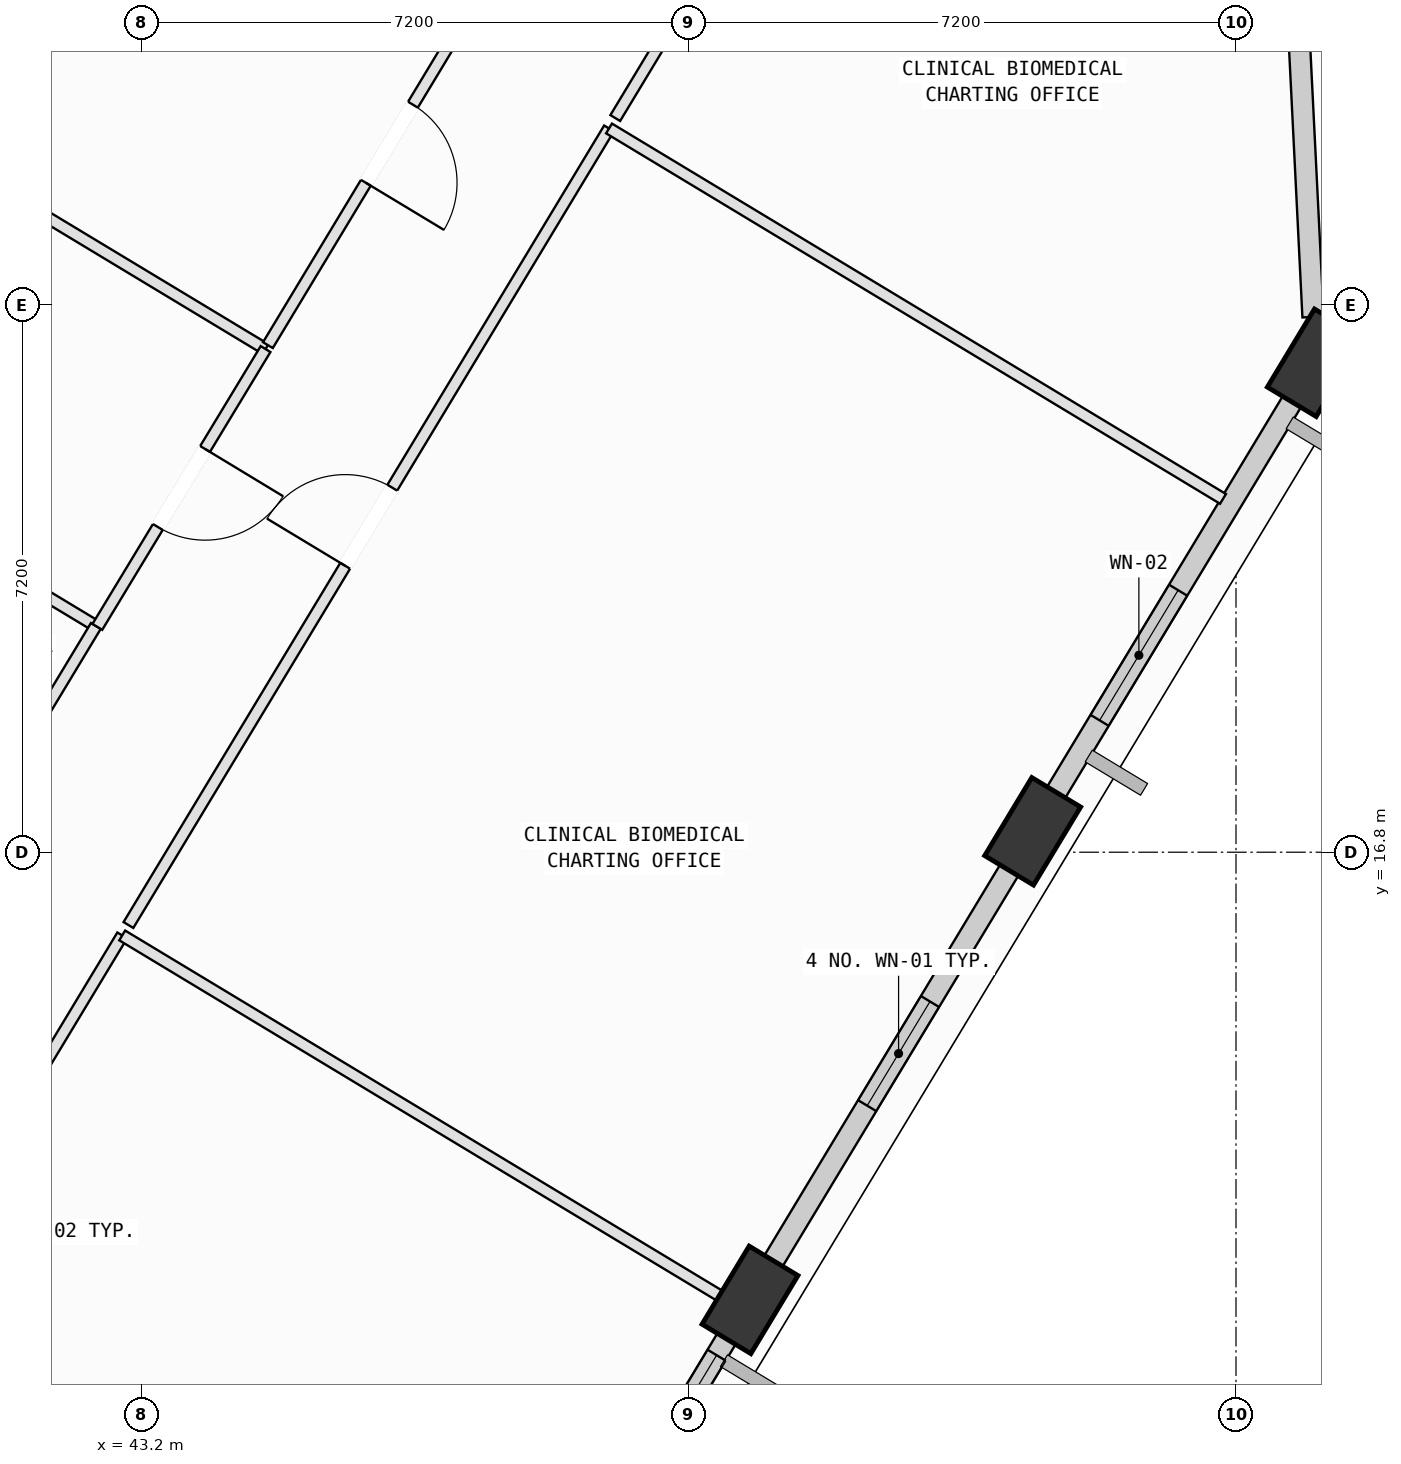
"""IFC4 building model, lengths in metres.
Left out: names, types, materials, properties, quantities, classifications, styles, units other than length and angle.
Written with IfcOpenShell. Run it as: python <this file> out.ifc"""

import sys

from ifc_helpers import new_model, si_unit, direction, frame, frame_2d, origin, origin_2d, place, context, subcontext, project, spatial, rectangle, extrude, element, fill, save


model = new_model("IFC4")
c1 = context("Model", 3, precision=1e-05, world=origin(), true_north=direction((0.0, 1.0)))
c2 = subcontext(c1, "Body", "Model", "MODEL_VIEW")
j1 = project(units=[si_unit("LENGTHUNIT", "METRE"), si_unit("PLANEANGLEUNIT", "RADIAN")], contexts=[c1])
p1 = place(None, origin())
s1 = spatial("IfcSite", under=j1, at=p1, CompositionType="ELEMENT")
p2 = place(p1, origin())
s2 = spatial("IfcBuilding", under=s1, at=p2, CompositionType="ELEMENT")
p3 = place(p2, frame((0.0, 0.0, 276.6)))
s3 = spatial("IfcBuildingStorey", under=s2, at=p3, CompositionType="ELEMENT", Elevation=276.6)
p4 = place(p3, frame((51.206, 10.91, 0.002), z_axis=(0.056692424578, 0.073177024428, 0.995706328237), x_axis=(-0.930488175419, -0.357643802358, 0.079263270434)))
e1 = element("IfcColumn", 1, at=p4, inside=s3, PredefinedType="COLUMN", context=c2, shape_type="SweptSolid", body=[
    extrude(rectangle(XDim=1.2, YDim=0.75, at=origin_2d()), origin(), (0.0, 0.0, 1.0), 4.014),
])
p5 = place(p3, frame((54.925, 17.075, 0.002), z_axis=(0.031141357072, 0.088254119357, 0.995611081847), x_axis=(-0.770772512069, -0.632050636346, 0.080135683274)))
e2 = element("IfcColumn", 2, at=p5, inside=s3, PredefinedType="COLUMN", context=c2, shape_type="SweptSolid", body=[
    extrude(rectangle(XDim=1.2, YDim=0.75, at=origin_2d()), origin(), (0.0, 0.0, 1.0), 4.014),
])
p6 = place(p3, frame((58.644, 23.24, 0.002), z_axis=(0.005590225413, 0.103297643506, 0.994634780322), x_axis=(-0.561801790444, -0.822515876559, 0.08857980053)))
e3 = element("IfcColumn", 3, at=p6, inside=s3, PredefinedType="COLUMN", context=c2, shape_type="SweptSolid", body=[
    extrude(rectangle(XDim=1.2, YDim=0.75, at=origin_2d()), origin(), (0.0, 0.0, 1.0), 4.018),
])
p7 = place(p3, frame((51.096, 10.728, 0.0), z_axis=(0.0, 0.0, 1.0), x_axis=(-0.516526398174, -0.856271265423, 0.0)))
e4 = element("IfcWall", 4, at=p7, inside=s3, PredefinedType="SOLIDWALL", context=c2, shape_type="SweptSolid", body=[
    extrude(rectangle(XDim=6.414, YDim=0.28, at=frame_2d((3.207, 0.0))), origin(), (0.0, 0.0, 1.0), 3.265),
])
p8 = place(p7, frame((2.604, 0.0, 0.75)))
e5 = element("IfcOpeningElement", 5, at=p8, cuts=e4, PredefinedType="OPENING", context=c2, shape_type="SweptSolid", body=[
    extrude(rectangle(XDim=1.2, YDim=1.75, at=frame_2d((0.6, 0.875))), frame((0.0, 0.15, 0.0), z_axis=(0.0, -1.0, 0.0), x_axis=(1.0, 0.0, 0.0)), (0.0, 0.0, 1.0), 0.3),
])
p9 = place(p7, frame((0.637, 0.0, 0.75)))
e6 = element("IfcOpeningElement", 6, at=p9, cuts=e4, PredefinedType="OPENING", context=c2, shape_type="SweptSolid", body=[
    extrude(rectangle(XDim=1.2, YDim=1.75, at=frame_2d((0.6, 0.875))), frame((0.0, 0.15, 0.0), z_axis=(0.0, -1.0, 0.0), x_axis=(1.0, 0.0, 0.0)), (0.0, 0.0, 1.0), 0.3),
])
p10 = place(p3, frame((54.815, 16.894, 0.0), z_axis=(0.0, 0.0, 1.0), x_axis=(-0.516539738379, -0.856263218102, 0.0)))
e7 = element("IfcWall", 7, at=p10, inside=s3, PredefinedType="SOLIDWALL", context=c2, shape_type="SweptSolid", body=[
    extrude(rectangle(XDim=6.407, YDim=0.28, at=frame_2d((3.203, 0.0))), origin(), (0.0, 0.0, 1.0), 3.265),
])
p11 = place(p10, frame((2.404, 0.0, 0.75)))
e8 = element("IfcOpeningElement", 8, at=p11, cuts=e7, PredefinedType="OPENING", context=c2, shape_type="SweptSolid", body=[
    extrude(rectangle(XDim=1.6, YDim=1.95, at=frame_2d((0.8, 0.975))), frame((0.0, 0.15, 0.0), z_axis=(0.0, -1.0, 0.0), x_axis=(1.0, 0.0, 0.0)), (0.0, 0.0, 1.0), 0.3),
])
p12 = place(p3, frame((58.54, 23.067, 0.0), z_axis=(0.0, 0.0, 1.0), x_axis=(-0.51654717901, -0.856258729507, 0.0)))
e9 = element("IfcWall", 9, at=p12, inside=s3, PredefinedType="SOLIDWALL", context=c2, shape_type="SweptSolid", body=[
    extrude(rectangle(XDim=6.418, YDim=0.28, at=frame_2d((3.209, 0.0))), origin(), (0.0, 0.0, 1.0), 3.265),
])
p13 = place(p12, frame((3.293, 0.0, 0.75)))
e10 = element("IfcOpeningElement", 10, at=p13, cuts=e9, PredefinedType="OPENING", context=c2, shape_type="SweptSolid", body=[
    extrude(rectangle(XDim=2.0, YDim=1.95, at=frame_2d((1.0, 0.975))), frame((0.0, 0.15, 0.0), z_axis=(0.0, -1.0, 0.0), x_axis=(1.0, 0.0, 0.0)), (0.0, 0.0, 1.0), 0.3),
])
p14 = place(p3, frame((58.35, 29.13, 0.0), z_axis=(0.0, 0.0, 1.0), x_axis=(0.049760507536, -0.998761178606, 0.0)))
e11 = element("IfcWall", 11, at=p14, inside=s3, PredefinedType="SOLIDWALL", context=c2, shape_type="SweptSolid", body=[
    extrude(rectangle(XDim=5.294, YDim=0.28, at=frame_2d((2.647, 0.0))), origin(), (0.0, 0.0, 1.0), 3.265),
])
p15 = place(p3, frame((39.48, 9.96, 0.0), z_axis=(0.0, 0.0, 1.0), x_axis=(0.516575747775, 0.856241494446, 0.0)))
e12 = element("IfcWall", 12, at=p15, inside=s3, PredefinedType="PARTITIONING", context=c2, shape_type="SweptSolid", body=[
    extrude(rectangle(XDim=6.71, YDim=0.15, at=frame_2d((3.355, 0.0))), origin(), (0.0, 0.0, 1.0), 3.78),
])
p16 = place(p15, frame((2.755, 0.0, 0.0)))
e13 = element("IfcOpeningElement", 13, at=p16, cuts=e12, PredefinedType="OPENING", context=c2, shape_type="SweptSolid", body=[
    extrude(rectangle(XDim=1.2, YDim=2.15, at=frame_2d((0.6, 1.075))), frame((0.0, 0.085, 0.0), z_axis=(0.0, -1.0, 0.0), x_axis=(1.0, 0.0, 0.0)), (0.0, 0.0, 1.0), 0.17),
])
p17 = place(p3, frame((42.946, 15.705, 0.0), z_axis=(0.0, 0.0, 1.0), x_axis=(0.85631180797, -0.516459182831, 0.0)))
e14 = element("IfcWall", 14, at=p17, inside=s3, PredefinedType="PARTITIONING", context=c2, shape_type="SweptSolid", body=[
    extrude(rectangle(XDim=9.447, YDim=0.15, at=frame_2d((4.724, 0.0))), origin(), (0.0, 0.0, 1.0), 3.78),
])
p18 = place(p3, frame((43.028, 15.842, 0.0), z_axis=(0.0, 0.0, 1.0), x_axis=(0.516562112888, 0.856249720309, 0.0)))
e15 = element("IfcWall", 15, at=p18, inside=s3, PredefinedType="PARTITIONING", context=c2, shape_type="SweptSolid", body=[
    extrude(rectangle(XDim=12.24, YDim=0.15, at=frame_2d((6.12, 0.0))), origin(), (0.0, 0.0, 1.0), 3.415),
])
p19 = place(p18, frame((5.52, 0.0, 0.0)))
e16 = element("IfcOpeningElement", 16, at=p19, cuts=e15, PredefinedType="OPENING", context=c2, shape_type="SweptSolid", body=[
    extrude(rectangle(XDim=1.2, YDim=2.15, at=frame_2d((0.6, 1.075))), frame((0.0, 0.085, 0.0), z_axis=(0.0, -1.0, 0.0), x_axis=(1.0, 0.0, 0.0)), (0.0, 0.0, 1.0), 0.17),
])
p20 = place(p3, frame((49.351, 26.323, 0.0), z_axis=(0.0, 0.0, 1.0), x_axis=(0.856213909792, -0.516621467497, 0.0)))
e17 = element("IfcWall", 17, at=p20, inside=s3, PredefinedType="PARTITIONING", context=c2, shape_type="SweptSolid", body=[
    extrude(rectangle(XDim=9.434, YDim=0.15, at=frame_2d((4.717, 0.0))), origin(), (0.0, 0.0, 1.0), 3.78),
])
p21 = place(p3, frame((55.421, 17.452, 0.0), z_axis=(0.0, 0.0, 1.0), x_axis=(-0.516130040248, -0.856510234355, 0.0)))
e18 = element("IfcWall", 18, at=p21, inside=s3, PredefinedType="PARTITIONING", context=c2, shape_type="SweptSolid", body=[
    extrude(rectangle(XDim=0.791, YDim=0.15, at=frame_2d((0.395, 0.0))), origin(), (0.0, 0.0, 1.0), 3.265),
])
p22 = place(p3, frame((51.703, 11.289, 0.0), z_axis=(0.0, 0.0, 1.0), x_axis=(-0.515730444954, -0.856750902041, 0.0)))
e19 = element("IfcWall", 19, at=p22, inside=s3, PredefinedType="PARTITIONING", context=c2, shape_type="SweptSolid", body=[
    extrude(rectangle(XDim=0.581, YDim=0.15, at=frame_2d((0.291, 0.0))), origin(), (0.0, 0.0, 1.0), 3.265),
])
p23 = place(p3, frame((60.158, 25.304, 0.0), z_axis=(0.0, 0.0, 1.0), x_axis=(-0.516451858287, -0.85631622551, 0.0)))
e20 = element("IfcWall", 20, at=p23, inside=s3, PredefinedType="PARTITIONING", context=c2, shape_type="SweptSolid", body=[
    extrude(rectangle(XDim=2.751, YDim=0.15, at=frame_2d((1.375, 0.0))), origin(), (0.0, 0.0, 1.0), 3.265),
])
p24 = place(p3, frame((49.433, 26.46, 0.0), z_axis=(0.0, 0.0, 1.0), x_axis=(0.516637382187, 0.856204307001, 0.0)))
e21 = element("IfcWall", 21, at=p24, inside=s3, PredefinedType="PARTITIONING", context=c2, shape_type="SweptSolid", body=[
    extrude(rectangle(XDim=6.935, YDim=0.15, at=frame_2d((3.468, 0.0))), origin(), (0.0, 0.0, 1.0), 3.78),
])
p25 = place(p24, frame((2.868, 0.0, 0.0)))
e22 = element("IfcOpeningElement", 22, at=p25, cuts=e21, PredefinedType="OPENING", context=c2, shape_type="SweptSolid", body=[
    extrude(rectangle(XDim=1.2, YDim=2.15, at=frame_2d((0.6, 1.075))), frame((0.0, 0.085, 0.0), z_axis=(0.0, -1.0, 0.0), x_axis=(1.0, 0.0, 0.0)), (0.0, 0.0, 1.0), 0.17),
])
p26 = place(p3, frame((58.707, 27.99, 0.0), z_axis=(0.0, 0.0, 1.0), x_axis=(0.856196976415, -0.516649530704, 0.0)))
e23 = element("IfcWall", 23, at=p26, inside=s3, PredefinedType="PARTITIONING", context=c2, shape_type="SweptSolid", body=[
    extrude(rectangle(XDim=1.399, YDim=0.15, at=frame_2d((0.7, 0.0))), origin(), (0.0, 0.0, 1.0), 3.78),
])
p27 = place(p3, frame((34.464, 24.684, 0.0), z_axis=(0.0, 0.0, 1.0), x_axis=(0.856284272725, -0.516504834714, 0.0)))
e24 = element("IfcWall", 24, at=p27, inside=s3, PredefinedType="PARTITIONING", context=c2, shape_type="SweptSolid", body=[
    extrude(rectangle(XDim=9.5, YDim=0.15, at=frame_2d((4.75, 0.0))), origin(), (0.0, 0.0, 1.0), 3.78),
])
p28 = place(p3, frame((42.599, 19.777, 0.0), z_axis=(0.0, 0.0, 1.0), x_axis=(-0.516569402647, -0.856245322468, 0.0)))
e25 = element("IfcWall", 25, at=p28, inside=s3, PredefinedType="PARTITIONING", context=c2, shape_type="SweptSolid", body=[
    extrude(rectangle(XDim=6.038, YDim=0.15, at=frame_2d((3.019, 0.0))), origin(), (0.0, 0.0, 1.0), 3.78),
])
p29 = place(p3, frame((37.241, 27.999, 0.0), z_axis=(0.0, 0.0, 1.0), x_axis=(0.856273135167, -0.516523298594, 0.0)))
e26 = element("IfcWall", 26, at=p29, inside=s3, PredefinedType="PARTITIONING", context=c2, shape_type="SweptSolid", body=[
    extrude(rectangle(XDim=8.865, YDim=0.15, at=frame_2d((4.433, 0.0))), origin(), (0.0, 0.0, 1.0), 3.78),
])
p30 = place(p3, frame((44.832, 23.42, 0.0), z_axis=(0.0, 0.0, 1.0), x_axis=(-0.517953436176, -0.855408813348, 0.0)))
e27 = element("IfcWall", 27, at=p30, inside=s3, PredefinedType="PARTITIONING", context=c2, shape_type="SweptSolid", body=[
    extrude(rectangle(XDim=4.273, YDim=0.15, at=frame_2d((2.136, 0.0))), origin(), (0.0, 0.0, 1.0), 3.78),
])
p31 = place(p30, frame((1.536, 0.0, 0.0)))
e28 = element("IfcOpeningElement", 28, at=p31, cuts=e27, PredefinedType="OPENING", context=c2, shape_type="SweptSolid", body=[
    extrude(rectangle(XDim=1.2, YDim=2.15, at=frame_2d((0.6, 1.075))), frame((0.0, 0.085, 0.0), z_axis=(0.0, -1.0, 0.0), x_axis=(1.0, 0.0, 0.0)), (0.0, 0.0, 1.0), 0.17),
])
p32 = place(p3, frame((48.06, 28.772, 0.0), z_axis=(0.0, 0.0, 1.0), x_axis=(-0.516512910077, -0.85627940167, 0.0)))
e29 = element("IfcWall", 29, at=p32, inside=s3, PredefinedType="PARTITIONING", context=c2, shape_type="SweptSolid", body=[
    extrude(rectangle(XDim=6.19, YDim=0.15, at=frame_2d((3.095, 0.0))), origin(), (0.0, 0.0, 1.0), 3.78),
])
p33 = place(p32, frame((2.495, 0.0, 0.0)))
e30 = element("IfcOpeningElement", 30, at=p33, cuts=e29, PredefinedType="OPENING", context=c2, shape_type="SweptSolid", body=[
    extrude(rectangle(XDim=1.2, YDim=2.15, at=frame_2d((0.6, 1.075))), frame((0.0, 0.085, 0.0), z_axis=(0.0, -1.0, 0.0), x_axis=(1.0, 0.0, 0.0)), (0.0, 0.0, 1.0), 0.17),
])
p34 = place(p9, origin())
e31 = element("IfcWindow", 31, at=p34, inside=s3, PartitioningType="SINGLE_PANEL", PredefinedType="WINDOW", context=c2, shape_type="SweptSolid", body=[
    extrude(rectangle(XDim=1.2, YDim=1.75, at=frame_2d((0.6, 0.875))), frame((0.0, 0.03, 0.0), z_axis=(0.0, -1.0, 0.0), x_axis=(1.0, 0.0, 0.0)), (0.0, 0.0, 1.0), 0.06),
])
fill(e6, e31)
p35 = place(p11, origin())
e32 = element("IfcWindow", 32, at=p35, inside=s3, PartitioningType="SINGLE_PANEL", PredefinedType="WINDOW", context=c2, shape_type="SweptSolid", body=[
    extrude(rectangle(XDim=1.6, YDim=1.95, at=frame_2d((0.8, 0.975))), frame((0.0, 0.03, 0.0), z_axis=(0.0, -1.0, 0.0), x_axis=(1.0, 0.0, 0.0)), (0.0, 0.0, 1.0), 0.06),
])
fill(e8, e32)
p36 = place(p13, origin())
e33 = element("IfcWindow", 33, at=p36, inside=s3, PartitioningType="SINGLE_PANEL", PredefinedType="WINDOW", context=c2, shape_type="SweptSolid", body=[
    extrude(rectangle(XDim=2.0, YDim=1.95, at=frame_2d((1.0, 0.975))), frame((0.0, 0.03, 0.0), z_axis=(0.0, -1.0, 0.0), x_axis=(1.0, 0.0, 0.0)), (0.0, 0.0, 1.0), 0.06),
])
fill(e10, e33)
p37 = place(p19, origin())
e34 = element("IfcDoor", 34, at=p37, inside=s3, OperationType="SINGLE_SWING_LEFT", PredefinedType="DOOR", context=c2, shape_type="SweptSolid", body=[
    extrude(rectangle(XDim=1.2, YDim=2.15, at=frame_2d((0.6, 1.075))), frame((0.0, 0.025, 0.0), z_axis=(0.0, -1.0, 0.0), x_axis=(1.0, 0.0, 0.0)), (0.0, 0.0, 1.0), 0.05),
])
fill(e16, e34)
p38 = place(p31, origin())
e35 = element("IfcDoor", 35, at=p38, inside=s3, OperationType="SINGLE_SWING_LEFT", PredefinedType="DOOR", context=c2, shape_type="SweptSolid", body=[
    extrude(rectangle(XDim=1.2, YDim=2.15, at=frame_2d((0.6, 1.075))), frame((0.0, 0.025, 0.0), z_axis=(0.0, -1.0, 0.0), x_axis=(1.0, 0.0, 0.0)), (0.0, 0.0, 1.0), 0.05),
])
fill(e28, e35)
p39 = place(p33, origin())
e36 = element("IfcDoor", 36, at=p39, inside=s3, OperationType="SINGLE_SWING_RIGHT", PredefinedType="DOOR", context=c2, shape_type="SweptSolid", body=[
    extrude(rectangle(XDim=1.2, YDim=2.15, at=frame_2d((0.6, 1.075))), frame((0.0, 0.025, 0.0), z_axis=(0.0, -1.0, 0.0), x_axis=(1.0, 0.0, 0.0)), (0.0, 0.0, 1.0), 0.05),
])
fill(e30, e36)
save(model, sys.argv[1])
